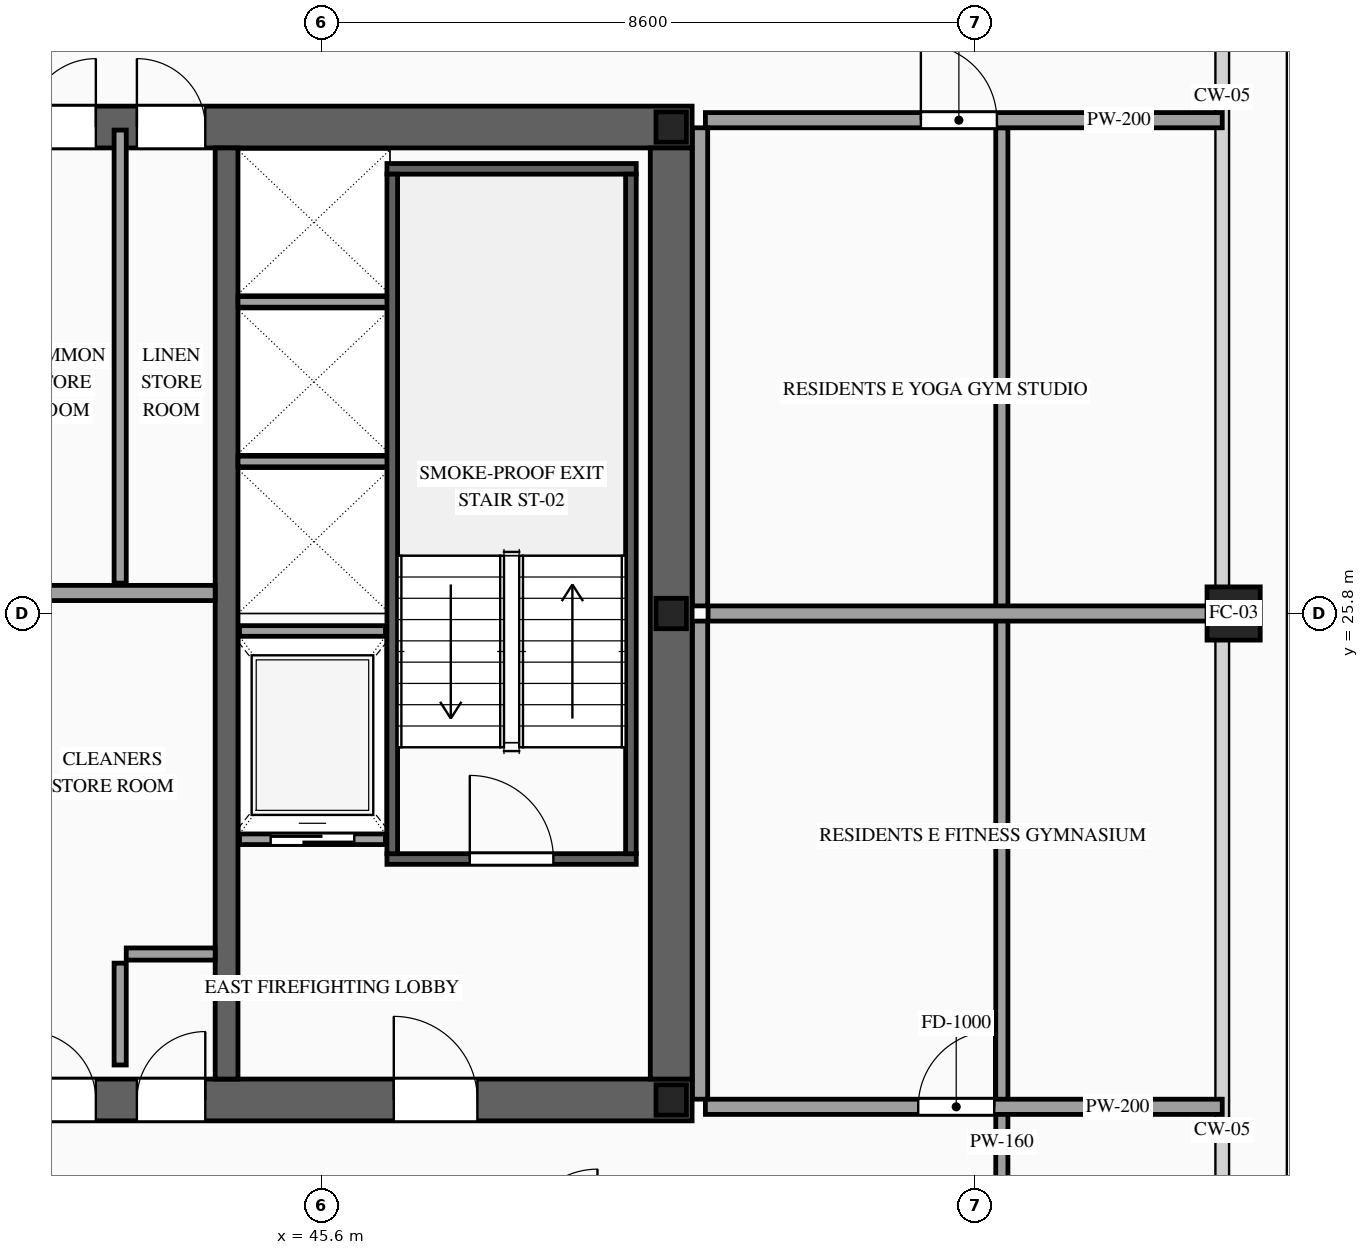
"""IFC4 building model, lengths in metres.
Left out: names, types, materials, properties, quantities, classifications, styles, units other than length and angle.
Written with IfcOpenShell. Run it as: python <this file> out.ifc"""

import sys

from ifc_helpers import new_model, si_unit, direction, frame, frame_2d, origin, origin_2d, place, context, subcontext, project, spatial, rectangle, hollow_rectangle, i_section, extrude, source, transform, mapped, element, fill, save


model = new_model("IFC4")
c1 = context("Model", 3, precision=1e-05, world=origin(), true_north=direction((0.0, 1.0)))
c2 = subcontext(c1, "Body", "Model", "MODEL_VIEW")
j1 = project(units=[si_unit("LENGTHUNIT", "METRE"), si_unit("PLANEANGLEUNIT", "RADIAN")], contexts=[c1])
p1 = place(None, origin())
s1 = spatial("IfcSite", under=j1, at=p1, CompositionType="ELEMENT")
p2 = place(p1, origin())
s2 = spatial("IfcBuilding", under=s1, at=p2, CompositionType="ELEMENT")
p3 = place(p2, frame((0.0, 0.0, 234.6)))
s3 = spatial("IfcBuildingStorey", under=s2, at=p3, CompositionType="ELEMENT", Elevation=234.6)
p4 = place(p3, frame((23.525, 19.4, 0.0), z_axis=(0.0, 0.0, 1.0), x_axis=(1.0, 0.0, 0.0)))
e1 = element("IfcWall", 1, at=p4, inside=s3, PredefinedType="SHEAR", context=c2, shape_type="SweptSolid", body=[
    extrude(rectangle(XDim=26.95, YDim=0.55, at=frame_2d((13.475, 0.0))), origin(), (0.0, 0.0, 1.0), 3.5),
])
p5 = place(p4, frame((1.925, 0.0, 0.0)))
e2 = element("IfcOpeningElement", 2, at=p5, cuts=e1, PredefinedType="OPENING", context=c2, shape_type="SweptSolid", body=[
    extrude(rectangle(XDim=1.1, YDim=2.2, at=frame_2d((0.55, 1.1))), frame((0.0, 0.29, 0.0), z_axis=(0.0, -1.0, 0.0), x_axis=(1.0, 0.0, 0.0)), (0.0, 0.0, 1.0), 0.58),
])
p6 = place(p4, frame((9.825, 0.0, 0.0)))
e3 = element("IfcOpeningElement", 3, at=p6, cuts=e1, PredefinedType="OPENING", context=c2, shape_type="SweptSolid", body=[
    extrude(rectangle(XDim=1.1, YDim=2.2, at=frame_2d((0.55, 1.1))), frame((0.0, 0.29, 0.0), z_axis=(0.0, -1.0, 0.0), x_axis=(1.0, 0.0, 0.0)), (0.0, 0.0, 1.0), 0.58),
])
p7 = place(p4, frame((23.025, 0.0, 0.0)))
e4 = element("IfcOpeningElement", 4, at=p7, cuts=e1, PredefinedType="OPENING", context=c2, shape_type="SweptSolid", body=[
    extrude(rectangle(XDim=1.1, YDim=2.2, at=frame_2d((0.55, 1.1))), frame((0.0, 0.29, 0.0), z_axis=(0.0, -1.0, 0.0), x_axis=(1.0, 0.0, 0.0)), (0.0, 0.0, 1.0), 0.58),
])
p8 = place(p4, frame((19.645, 0.0, 0.0)))
e5 = element("IfcOpeningElement", 5, at=p8, cuts=e1, PredefinedType="OPENING", context=c2, shape_type="SweptSolid", body=[
    extrude(rectangle(XDim=0.9, YDim=2.15, at=frame_2d((0.45, 1.075))), frame((0.0, 0.29, 0.0), z_axis=(0.0, -1.0, 0.0), x_axis=(1.0, 0.0, 0.0)), (0.0, 0.0, 1.0), 0.58),
])
p9 = place(p4, frame((18.205, 0.0, 0.0)))
e6 = element("IfcOpeningElement", 6, at=p9, cuts=e1, PredefinedType="OPENING", context=c2, shape_type="SweptSolid", body=[
    extrude(rectangle(XDim=0.9, YDim=2.15, at=frame_2d((0.45, 1.075))), frame((0.0, 0.29, 0.0), z_axis=(0.0, -1.0, 0.0), x_axis=(1.0, 0.0, 0.0)), (0.0, 0.0, 1.0), 0.58),
])
p10 = place(p3, frame((23.525, 32.2, 0.0), z_axis=(0.0, 0.0, 1.0), x_axis=(1.0, 0.0, 0.0)))
e7 = element("IfcWall", 7, at=p10, inside=s3, PredefinedType="SHEAR", context=c2, shape_type="SweptSolid", body=[
    extrude(rectangle(XDim=26.95, YDim=0.55, at=frame_2d((13.475, 0.0))), origin(), (0.0, 0.0, 1.0), 3.5),
])
p11 = place(p10, frame((4.545, 0.0, 0.0)))
e8 = element("IfcOpeningElement", 8, at=p11, cuts=e7, PredefinedType="OPENING", context=c2, shape_type="SweptSolid", body=[
    extrude(rectangle(XDim=0.9, YDim=2.15, at=frame_2d((0.45, 1.075))), frame((0.0, 0.29, 0.0), z_axis=(0.0, -1.0, 0.0), x_axis=(1.0, 0.0, 0.0)), (0.0, 0.0, 1.0), 0.58),
])
p12 = place(p10, frame((9.825, 0.0, 0.0)))
e9 = element("IfcOpeningElement", 9, at=p12, cuts=e7, PredefinedType="OPENING", context=c2, shape_type="SweptSolid", body=[
    extrude(rectangle(XDim=1.1, YDim=2.2, at=frame_2d((0.55, 1.1))), frame((0.0, 0.29, 0.0), z_axis=(0.0, -1.0, 0.0), x_axis=(1.0, 0.0, 0.0)), (0.0, 0.0, 1.0), 0.58),
])
p13 = place(p10, frame((15.675, 0.0, 0.0)))
e10 = element("IfcOpeningElement", 10, at=p13, cuts=e7, PredefinedType="OPENING", context=c2, shape_type="SweptSolid", body=[
    extrude(rectangle(XDim=1.1, YDim=2.2, at=frame_2d((0.55, 1.1))), frame((0.0, 0.29, 0.0), z_axis=(0.0, -1.0, 0.0), x_axis=(1.0, 0.0, 0.0)), (0.0, 0.0, 1.0), 0.58),
])
p14 = place(p10, frame((18.205, 0.0, 0.0)))
e11 = element("IfcOpeningElement", 11, at=p14, cuts=e7, PredefinedType="OPENING", context=c2, shape_type="SweptSolid", body=[
    extrude(rectangle(XDim=0.9, YDim=2.15, at=frame_2d((0.45, 1.075))), frame((0.0, 0.29, 0.0), z_axis=(0.0, -1.0, 0.0), x_axis=(1.0, 0.0, 0.0)), (0.0, 0.0, 1.0), 0.58),
])
p15 = place(p10, frame((19.645, 0.0, 0.0)))
e12 = element("IfcOpeningElement", 12, at=p15, cuts=e7, PredefinedType="OPENING", context=c2, shape_type="SweptSolid", body=[
    extrude(rectangle(XDim=0.9, YDim=2.15, at=frame_2d((0.45, 1.075))), frame((0.0, 0.29, 0.0), z_axis=(0.0, -1.0, 0.0), x_axis=(1.0, 0.0, 0.0)), (0.0, 0.0, 1.0), 0.58),
])
m1 = source(origin(), c2, "Body", "SweptSolid", [
    extrude(rectangle(XDim=12.25, YDim=0.55, at=frame_2d((6.125, 0.0))), origin(), (0.0, 0.0, 1.0), 3.5),
])
p16 = place(p3, frame((50.2, 19.675, 0.0), z_axis=(0.0, 0.0, 1.0), x_axis=(0.0, 1.0, 0.0)))
e13 = element("IfcWall", 13, at=p16, inside=s3, PredefinedType="SHEAR", context=c2, shape_type="MappedRepresentation", body=[
    mapped(m1, transform((0.0, 0.0, 0.0), scale=1.0)),
])
m2 = source(origin(), c2, "Body", "SweptSolid", [
    extrude(rectangle(XDim=12.25, YDim=0.3, at=frame_2d((6.125, 0.0))), origin(), (0.0, 0.0, 1.0), 3.5),
])
p17 = place(p3, frame((44.35, 19.675, 0.0), z_axis=(0.0, 0.0, 1.0), x_axis=(0.0, 1.0, 0.0)))
e14 = element("IfcWall", 14, at=p17, inside=s3, PredefinedType="SOLIDWALL", context=c2, shape_type="MappedRepresentation", body=[
    mapped(m2, transform((0.0, 0.0, 0.0), scale=1.0)),
])
m3 = source(origin(), c2, "Body", "SweptSolid", [
    extrude(i_section(OverallWidth=0.4, OverallDepth=0.4, WebThickness=0.013, FlangeThickness=0.021, at=origin_2d()), origin(), (0.0, 0.0, 1.0), 3.5),
])
for number, where, z_axis, x_axis in (
    (15, (50.2, 19.4, 0.0), (0.0, 0.0, 1.0), (1.0, 0.0, 0.0)),
    (16, (50.2, 25.8, 0.0), (0.0, 0.0, 1.0), (1.0, 0.0, 0.0)),
    (17, (50.2, 32.2, 0.0), (0.0, 0.0, 1.0), (1.0, 0.0, 0.0)),
):
    element("IfcColumn", number, at=place(p3, frame(where, z_axis=z_axis, x_axis=x_axis)), inside=s3, PredefinedType="COLUMN", context=c2, shape_type="MappedRepresentation", body=[
        mapped(m3, transform((0.0, 0.0, 0.0), scale=1.0)),
    ])
m4 = source(origin(), c2, "Body", "SweptSolid", [
    extrude(hollow_rectangle(XDim=0.7, YDim=0.7, WallThickness=0.032, at=origin_2d()), origin(), (0.0, 0.0, 1.0), 3.5),
])
p18 = place(p3, frame((57.6, 25.8, 0.0), z_axis=(0.0, 0.0, 1.0), x_axis=(1.0, 0.0, 0.0)))
e18 = element("IfcColumn", 18, at=p18, inside=s3, PredefinedType="COLUMN", context=c2, shape_type="MappedRepresentation", body=[
    mapped(m4, transform((0.0, 0.0, 0.0), scale=1.0)),
])
p19 = place(p3, frame((44.52, 22.83, 0.0), z_axis=(0.0, 0.0, 1.0), x_axis=(1.0, 0.0, 0.0)))
e19 = element("IfcWall", 19, at=p19, inside=s3, PredefinedType="SOLIDWALL", context=c2, shape_type="SweptSolid", body=[
    extrude(rectangle(XDim=1.92, YDim=0.14, at=frame_2d((0.96, 0.0))), origin(), (0.0, 0.0, 1.0), 3.28),
])
p20 = place(p19, frame((0.41, 0.0, 0.0)))
e20 = element("IfcOpeningElement", 20, at=p20, cuts=e19, PredefinedType="OPENING", context=c2, shape_type="SweptSolid", body=[
    extrude(rectangle(XDim=1.1, YDim=2.2, at=frame_2d((0.55, 1.1))), frame((0.0, 0.085, 0.0), z_axis=(0.0, -1.0, 0.0), x_axis=(1.0, 0.0, 0.0)), (0.0, 0.0, 1.0), 0.17),
])
m5 = source(origin(), c2, "Body", "SweptSolid", [
    extrude(rectangle(XDim=1.92, YDim=0.14, at=frame_2d((0.96, 0.0))), origin(), (0.0, 0.0, 1.0), 3.28),
])
p21 = place(p3, frame((44.52, 25.57, 0.0), z_axis=(0.0, 0.0, 1.0), x_axis=(1.0, 0.0, 0.0)))
e21 = element("IfcWall", 21, at=p21, inside=s3, PredefinedType="SOLIDWALL", context=c2, shape_type="MappedRepresentation", body=[
    mapped(m5, transform((0.0, 0.0, 0.0), scale=1.0)),
])
m6 = source(origin(), c2, "Body", "SweptSolid", [
    extrude(rectangle(XDim=2.0, YDim=0.14, at=frame_2d((1.0, 0.0))), origin(), (0.0, 0.0, 1.0), 3.28),
])
for number, where, z_axis, x_axis in (
    (22, (44.5, 27.8, 0.0), (0.0, 0.0, 1.0), (1.0, 0.0, 0.0)),
    (23, (44.5, 29.9, 0.0), (0.0, 0.0, 1.0), (1.0, 0.0, 0.0)),
):
    element("IfcWall", number, at=place(p3, frame(where, z_axis=z_axis, x_axis=x_axis)), inside=s3, PredefinedType="SOLIDWALL", context=c2, shape_type="MappedRepresentation", body=[
        mapped(m6, transform((0.0, 0.0, 0.0), scale=1.0)),
    ])
p22 = place(p3, frame((46.46, 22.57, 0.0), z_axis=(0.0, 0.0, 1.0), x_axis=(1.0, 0.0, 0.0)))
e24 = element("IfcWall", 24, at=p22, inside=s3, PredefinedType="SOLIDWALL", context=c2, shape_type="SweptSolid", body=[
    extrude(rectangle(XDim=3.28, YDim=0.14, at=frame_2d((1.64, 0.0))), origin(), (0.0, 0.0, 1.0), 3.28),
])
p23 = place(p22, frame((1.09, 0.0, 0.0)))
e25 = element("IfcOpeningElement", 25, at=p23, cuts=e24, PredefinedType="OPENING", context=c2, shape_type="SweptSolid", body=[
    extrude(rectangle(XDim=1.1, YDim=2.2, at=frame_2d((0.55, 1.1))), frame((0.0, 0.085, 0.0), z_axis=(0.0, -1.0, 0.0), x_axis=(1.0, 0.0, 0.0)), (0.0, 0.0, 1.0), 0.17),
])
m7 = source(origin(), c2, "Body", "SweptSolid", [
    extrude(rectangle(XDim=3.28, YDim=0.14, at=frame_2d((1.64, 0.0))), origin(), (0.0, 0.0, 1.0), 3.28),
])
p24 = place(p3, frame((46.46, 31.65, 0.0), z_axis=(0.0, 0.0, 1.0), x_axis=(1.0, 0.0, 0.0)))
e26 = element("IfcWall", 26, at=p24, inside=s3, PredefinedType="SOLIDWALL", context=c2, shape_type="MappedRepresentation", body=[
    mapped(m7, transform((0.0, 0.0, 0.0), scale=1.0)),
])
m8 = source(origin(), c2, "Body", "SweptSolid", [
    extrude(rectangle(XDim=8.94, YDim=0.14, at=frame_2d((4.47, 0.0))), origin(), (0.0, 0.0, 1.0), 3.28),
])
for number, where, z_axis, x_axis in (
    (27, (46.53, 22.64, 0.0), (0.0, 0.0, 1.0), (0.0, 1.0, 0.0)),
    (28, (49.67, 22.64, 0.0), (0.0, 0.0, 1.0), (0.0, 1.0, 0.0)),
):
    element("IfcWall", number, at=place(p3, frame(where, z_axis=z_axis, x_axis=x_axis)), inside=s3, PredefinedType="SOLIDWALL", context=c2, shape_type="MappedRepresentation", body=[
        mapped(m8, transform((0.0, 0.0, 0.0), scale=1.0)),
    ])
m9 = source(origin(), c2, "Body", "SweptSolid", [
    extrude(rectangle(XDim=1.34, YDim=0.16, at=frame_2d((0.67, 0.0))), origin(), (0.0, 0.0, 1.0), 3.28),
])
p25 = place(p3, frame((42.95, 19.86, 0.0), z_axis=(0.0, 0.0, 1.0), x_axis=(0.0, 1.0, 0.0)))
e29 = element("IfcWall", 29, at=p25, inside=s3, PredefinedType="PARTITIONING", context=c2, shape_type="MappedRepresentation", body=[
    mapped(m9, transform((0.0, 0.0, 0.0), scale=1.0)),
])
m10 = source(origin(), c2, "Body", "SweptSolid", [
    extrude(rectangle(XDim=1.17, YDim=0.16, at=frame_2d((0.585, 0.0))), origin(), (0.0, 0.0, 1.0), 3.28),
])
p26 = place(p3, frame((43.03, 21.32, 0.0), z_axis=(0.0, 0.0, 1.0), x_axis=(1.0, 0.0, 0.0)))
e30 = element("IfcWall", 30, at=p26, inside=s3, PredefinedType="PARTITIONING", context=c2, shape_type="MappedRepresentation", body=[
    mapped(m10, transform((0.0, 0.0, 0.0), scale=1.0)),
])
m11 = source(origin(), c2, "Body", "SweptSolid", [
    extrude(rectangle(XDim=2.7, YDim=0.2, at=frame_2d((1.35, 0.0))), origin(), (0.0, 0.0, 1.0), 3.28),
])
p27 = place(p3, frame((41.5, 26.07, 0.0), z_axis=(0.0, 0.0, 1.0), x_axis=(1.0, 0.0, 0.0)))
e31 = element("IfcWall", 31, at=p27, inside=s3, PredefinedType="PARTITIONING", context=c2, shape_type="MappedRepresentation", body=[
    mapped(m11, transform((0.0, 0.0, 0.0), scale=1.0)),
])
m12 = source(origin(), c2, "Body", "SweptSolid", [
    extrude(rectangle(XDim=5.96, YDim=0.16, at=frame_2d((2.98, 0.0))), origin(), (0.0, 0.0, 1.0), 3.28),
])
p28 = place(p3, frame((42.95, 26.2, 0.0), z_axis=(0.0, 0.0, 1.0), x_axis=(0.0, 1.0, 0.0)))
e32 = element("IfcWall", 32, at=p28, inside=s3, PredefinedType="PARTITIONING", context=c2, shape_type="MappedRepresentation", body=[
    mapped(m12, transform((0.0, 0.0, 0.0), scale=1.0)),
])
m13 = source(origin(), c2, "Body", "SweptSolid", [
    extrude(rectangle(XDim=26.69, YDim=0.16, at=frame_2d((13.345, 0.0))), origin(), (0.0, 0.0, 1.0), 3.28),
])
p29 = place(p3, frame((54.55, 5.5, 0.0), z_axis=(0.0, 0.0, 1.0), x_axis=(0.0, 1.0, 0.0)))
e33 = element("IfcWall", 33, at=p29, inside=s3, PredefinedType="PARTITIONING", context=c2, shape_type="MappedRepresentation", body=[
    mapped(m13, transform((0.0, 0.0, 0.0), scale=1.0)),
])
p30 = place(p3, frame((50.65, 19.31, 0.0), z_axis=(0.0, 0.0, 1.0), x_axis=(1.0, 0.0, 0.0)))
e34 = element("IfcWall", 34, at=p30, inside=s3, PredefinedType="PARTITIONING", context=c2, shape_type="SweptSolid", body=[
    extrude(rectangle(XDim=6.8, YDim=0.2, at=frame_2d((3.4, 0.0))), origin(), (0.0, 0.0, 1.0), 2.825),
])
p31 = place(p30, frame((2.8, 0.0, 0.0)))
e35 = element("IfcOpeningElement", 35, at=p31, cuts=e34, PredefinedType="OPENING", context=c2, shape_type="SweptSolid", body=[
    extrude(rectangle(XDim=1.0, YDim=2.2, at=frame_2d((0.5, 1.1))), frame((0.0, 0.115, 0.0), z_axis=(0.0, -1.0, 0.0), x_axis=(1.0, 0.0, 0.0)), (0.0, 0.0, 1.0), 0.23),
])
m14 = source(origin(), c2, "Body", "SweptSolid", [
    extrude(rectangle(XDim=6.765, YDim=0.2, at=frame_2d((3.382, 0.0))), origin(), (0.0, 0.0, 1.0), 2.787),
])
p32 = place(p3, frame((50.685, 25.8, 0.0), z_axis=(0.0, 0.0, 1.0), x_axis=(1.0, 0.0, 0.0)))
e36 = element("IfcWall", 36, at=p32, inside=s3, PredefinedType="PARTITIONING", context=c2, shape_type="MappedRepresentation", body=[
    mapped(m14, transform((0.0, 0.0, 0.0), scale=1.0)),
])
m15 = source(origin(), c2, "Body", "SweptSolid", [
    extrude(rectangle(XDim=6.29, YDim=0.2, at=frame_2d((3.145, 0.0))), origin(), (0.0, 0.0, 1.0), 3.28),
])
p33 = place(p3, frame((50.58, 19.41, 0.0), z_axis=(0.0, 0.0, 1.0), x_axis=(0.0, 1.0, 0.0)))
e37 = element("IfcWall", 37, at=p33, inside=s3, PredefinedType="PARTITIONING", context=c2, shape_type="MappedRepresentation", body=[
    mapped(m15, transform((0.0, 0.0, 0.0), scale=1.0)),
])
p34 = place(p3, frame((50.65, 32.29, 0.0), z_axis=(0.0, 0.0, 1.0), x_axis=(1.0, 0.0, 0.0)))
e38 = element("IfcWall", 38, at=p34, inside=s3, PredefinedType="PARTITIONING", context=c2, shape_type="SweptSolid", body=[
    extrude(rectangle(XDim=6.8, YDim=0.2, at=frame_2d((3.4, 0.0))), origin(), (0.0, 0.0, 1.0), 2.825),
])
p35 = place(p34, frame((2.835, 0.0, 0.0)))
e39 = element("IfcOpeningElement", 39, at=p35, cuts=e38, PredefinedType="OPENING", context=c2, shape_type="SweptSolid", body=[
    extrude(rectangle(XDim=1.0, YDim=2.2, at=frame_2d((0.5, 1.1))), frame((0.0, 0.115, 0.0), z_axis=(0.0, -1.0, 0.0), x_axis=(1.0, 0.0, 0.0)), (0.0, 0.0, 1.0), 0.23),
])
p36 = place(p3, frame((50.58, 25.9, 0.0), z_axis=(0.0, 0.0, 1.0), x_axis=(0.0, 1.0, 0.0)))
e40 = element("IfcWall", 40, at=p36, inside=s3, PredefinedType="PARTITIONING", context=c2, shape_type="MappedRepresentation", body=[
    mapped(m15, transform((0.0, 0.0, 0.0), scale=1.0)),
])
m16 = source(origin(), c2, "Body", "SweptSolid", [
    extrude(rectangle(XDim=1.1, YDim=2.2, at=frame_2d((0.55, 1.1))), frame((0.0, 0.025, 0.0), z_axis=(0.0, -1.0, 0.0), x_axis=(1.0, 0.0, 0.0)), (0.0, 0.0, 1.0), 0.05),
])
p37 = place(p20, origin())
e41 = element("IfcDoor", 41, at=p37, inside=s3, OperationType="SLIDING_TO_RIGHT", PredefinedType="DOOR", context=c2, shape_type="MappedRepresentation", body=[
    mapped(m16, transform((0.0, 0.0, 0.0), scale=1.0)),
])
fill(e20, e41)
m17 = source(origin(), c2, "Body", "SweptSolid", [
    extrude(rectangle(XDim=1.1, YDim=2.2, at=frame_2d((0.55, 1.1))), frame((0.0, 0.025, 0.0), z_axis=(0.0, -1.0, 0.0), x_axis=(1.0, 0.0, 0.0)), (0.0, 0.0, 1.0), 0.05),
])
p38 = place(p23, origin())
e42 = element("IfcDoor", 42, at=p38, inside=s3, OperationType="SINGLE_SWING_LEFT", PredefinedType="DOOR", context=c2, shape_type="MappedRepresentation", body=[
    mapped(m17, transform((0.0, 0.0, 0.0), scale=1.0)),
])
fill(e25, e42)
p39 = place(p7, origin())
e43 = element("IfcDoor", 43, at=p39, inside=s3, OperationType="SINGLE_SWING_LEFT", PredefinedType="DOOR", context=c2, shape_type="MappedRepresentation", body=[
    mapped(m17, transform((0.0, 0.0, 0.0), scale=1.0)),
])
fill(e4, e43)
m18 = source(origin(), c2, "Body", "SweptSolid", [
    extrude(rectangle(XDim=0.9, YDim=2.15, at=frame_2d((0.45, 1.075))), frame((0.0, 0.025, 0.0), z_axis=(0.0, -1.0, 0.0), x_axis=(1.0, 0.0, 0.0)), (0.0, 0.0, 1.0), 0.05),
])
p40 = place(p8, origin())
e44 = element("IfcDoor", 44, at=p40, inside=s3, OperationType="SINGLE_SWING_RIGHT", PredefinedType="DOOR", context=c2, shape_type="MappedRepresentation", body=[
    mapped(m18, transform((0.0, 0.0, 0.0), scale=1.0)),
])
fill(e5, e44)
p41 = place(p9, origin())
e45 = element("IfcDoor", 45, at=p41, inside=s3, OperationType="SINGLE_SWING_LEFT", PredefinedType="DOOR", context=c2, shape_type="MappedRepresentation", body=[
    mapped(m18, transform((0.0, 0.0, 0.0), scale=1.0)),
])
fill(e6, e45)
p42 = place(p14, origin())
e46 = element("IfcDoor", 46, at=p42, inside=s3, OperationType="SINGLE_SWING_RIGHT", PredefinedType="DOOR", context=c2, shape_type="MappedRepresentation", body=[
    mapped(m18, transform((0.0, 0.0, 0.0), scale=1.0)),
])
fill(e11, e46)
p43 = place(p15, origin())
e47 = element("IfcDoor", 47, at=p43, inside=s3, OperationType="SINGLE_SWING_LEFT", PredefinedType="DOOR", context=c2, shape_type="MappedRepresentation", body=[
    mapped(m18, transform((0.0, 0.0, 0.0), scale=1.0)),
])
fill(e12, e47)
m19 = source(origin(), c2, "Body", "SweptSolid", [
    extrude(rectangle(XDim=1.0, YDim=2.2, at=frame_2d((0.5, 1.1))), frame((0.0, 0.025, 0.0), z_axis=(0.0, -1.0, 0.0), x_axis=(1.0, 0.0, 0.0)), (0.0, 0.0, 1.0), 0.05),
])
p44 = place(p31, origin())
e48 = element("IfcDoor", 48, at=p44, inside=s3, OperationType="SINGLE_SWING_RIGHT", PredefinedType="DOOR", context=c2, shape_type="MappedRepresentation", body=[
    mapped(m19, transform((0.0, 0.0, 0.0), scale=1.0)),
])
fill(e35, e48)
p45 = place(p35, origin())
e49 = element("IfcDoor", 49, at=p45, inside=s3, OperationType="SINGLE_SWING_LEFT", PredefinedType="DOOR", context=c2, shape_type="MappedRepresentation", body=[
    mapped(m19, transform((0.0, 0.0, 0.0), scale=1.0)),
])
fill(e39, e49)
save(model, sys.argv[1])
